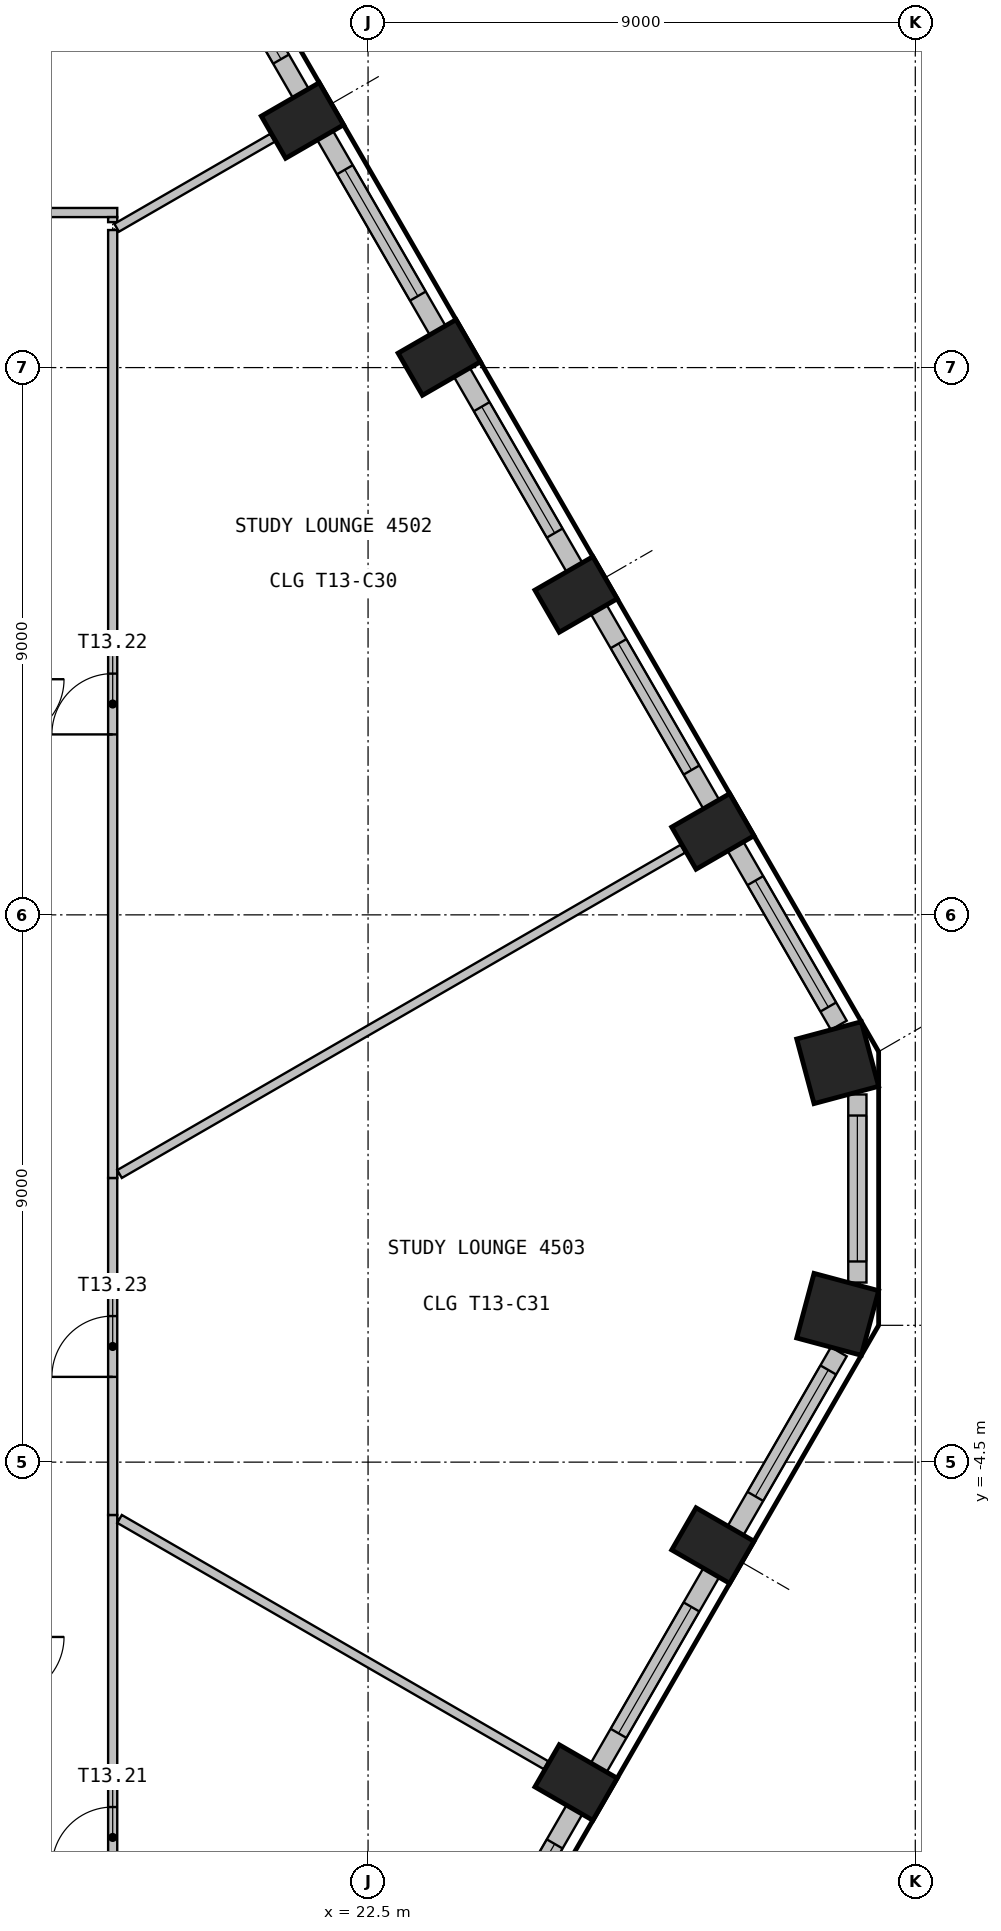
"""IFC4 building model, lengths in metres.
Left out: names, types, materials, properties, quantities, classifications, styles, units other than length and angle.
Written with IfcOpenShell. Run it as: python <this file> out.ifc"""

import sys

from ifc_helpers import new_model, si_unit, direction, frame, frame_2d, origin, origin_2d, place, context, subcontext, project, spatial, rectangle, extrude, element, fill, save


model = new_model("IFC4")
c1 = context("Model", 3, precision=1e-05, world=origin(), true_north=direction((0.0, 1.0)))
c2 = subcontext(c1, "Body", "Model", "MODEL_VIEW")
j1 = project(units=[si_unit("LENGTHUNIT", "METRE"), si_unit("PLANEANGLEUNIT", "RADIAN")], contexts=[c1])
p1 = place(None, origin())
s1 = spatial("IfcSite", under=j1, at=p1, CompositionType="ELEMENT")
p2 = place(p1, origin())
s2 = spatial("IfcBuilding", under=s1, at=p2, CompositionType="ELEMENT")
p3 = place(p2, frame((0.0, 0.0, 183.9)))
s3 = spatial("IfcBuildingStorey", under=s2, at=p3, CompositionType="ELEMENT", Elevation=183.9)
for number, where, z_axis, x_axis in (
    (1, (25.921, -9.769, 0.0), (0.0, 0.0, 1.0), (0.5, 0.866, 0.0)),
    (2, (28.171, -5.872, 0.0), (0.0, 0.0, 1.0), (0.5, 0.866, 0.0)),
):
    element("IfcColumn", number, at=place(p3, frame(where, z_axis=z_axis, x_axis=x_axis)), inside=s3, PredefinedType="COLUMN", context=c2, shape_type="SweptSolid", body=[
        extrude(rectangle(XDim=0.8, YDim=1.1, at=origin_2d()), origin(), (0.0, 0.0, 1.0), 3.55),
    ])
for number, where, z_axis, x_axis in (
    (3, (30.223, -2.07, 0.0), (0.0, 0.0, 1.0), (0.259, 0.966, 0.0)),
    (4, (30.223, 2.07, 0.0), (0.0, 0.0, 1.0), (-0.259, 0.966, 0.0)),
):
    element("IfcColumn", number, at=place(p3, frame(where, z_axis=z_axis, x_axis=x_axis)), inside=s3, PredefinedType="COLUMN", context=c2, shape_type="SweptSolid", body=[
        extrude(rectangle(XDim=1.1, YDim=1.1, at=origin_2d()), origin(), (0.0, 0.0, 1.0), 3.55),
    ])
for number, where, z_axis, x_axis in (
    (5, (28.171, 5.872, 0.0), (0.0, 0.0, 1.0), (-0.5, 0.866, 0.0)),
    (6, (25.921, 9.769, 0.0), (0.0, 0.0, 1.0), (-0.5, 0.866, 0.0)),
    (7, (23.671, 13.666, 0.0), (0.0, 0.0, 1.0), (-0.5, 0.866, 0.0)),
    (8, (21.421, 17.563, 0.0), (0.0, 0.0, 1.0), (-0.5, 0.866, 0.0)),
):
    element("IfcColumn", number, at=place(p3, frame(where, z_axis=z_axis, x_axis=x_axis)), inside=s3, PredefinedType="COLUMN", context=c2, shape_type="SweptSolid", body=[
        extrude(rectangle(XDim=0.8, YDim=1.1, at=origin_2d()), origin(), (0.0, 0.0, 1.0), 3.55),
    ])
p4 = place(p3, frame((24.044, -13.419, 0.0), z_axis=(0.0, 0.0, 1.0), x_axis=(0.500029062817, 0.866008623709, 0.0)))
e9 = element("IfcWall", 9, at=p4, inside=s3, PredefinedType="SOLIDWALL", context=c2, shape_type="SweptSolid", body=[
    extrude(rectangle(XDim=3.699, YDim=0.3, at=frame_2d((1.85, 0.0))), origin(), (0.0, 0.0, 1.0), 3.55),
])
p5 = place(p4, frame((0.649, 0.0, 0.9)))
e10 = element("IfcOpeningElement", 10, at=p5, cuts=e9, PredefinedType="OPENING", context=c2, shape_type="SweptSolid", body=[
    extrude(rectangle(XDim=2.4, YDim=2.1, at=frame_2d((1.2, 1.05))), frame((0.0, 0.16, 0.0), z_axis=(0.0, -1.0, 0.0), x_axis=(1.0, 0.0, 0.0)), (0.0, 0.0, 1.0), 0.32),
])
p6 = place(p3, frame((26.294, -9.522, 0.0), z_axis=(0.0, 0.0, 1.0), x_axis=(0.500029062817, 0.866008623709, 0.0)))
e11 = element("IfcWall", 11, at=p6, inside=s3, PredefinedType="SOLIDWALL", context=c2, shape_type="SweptSolid", body=[
    extrude(rectangle(XDim=3.699, YDim=0.3, at=frame_2d((1.85, 0.0))), origin(), (0.0, 0.0, 1.0), 3.55),
])
p7 = place(p6, frame((0.649, 0.0, 0.9)))
e12 = element("IfcOpeningElement", 12, at=p7, cuts=e11, PredefinedType="OPENING", context=c2, shape_type="SweptSolid", body=[
    extrude(rectangle(XDim=2.4, YDim=2.1, at=frame_2d((1.2, 1.05))), frame((0.0, 0.16, 0.0), z_axis=(0.0, -1.0, 0.0), x_axis=(1.0, 0.0, 0.0)), (0.0, 0.0, 1.0), 0.32),
])
p8 = place(p3, frame((28.544, -5.625, 0.0), z_axis=(0.0, 0.0, 1.0), x_axis=(0.500012868213, 0.866017974191, 0.0)))
e13 = element("IfcWall", 13, at=p8, inside=s3, PredefinedType="SOLIDWALL", context=c2, shape_type="SweptSolid", body=[
    extrude(rectangle(XDim=3.396, YDim=0.3, at=frame_2d((1.698, 0.0))), origin(), (0.0, 0.0, 1.0), 3.55),
])
p9 = place(p8, frame((0.649, 0.0, 0.9)))
e14 = element("IfcOpeningElement", 14, at=p9, cuts=e13, PredefinedType="OPENING", context=c2, shape_type="SweptSolid", body=[
    extrude(rectangle(XDim=2.4, YDim=2.1, at=frame_2d((1.2, 1.05))), frame((0.0, 0.16, 0.0), z_axis=(0.0, -1.0, 0.0), x_axis=(1.0, 0.0, 0.0)), (0.0, 0.0, 1.0), 0.32),
])
p10 = place(p3, frame((30.547, -1.546, 0.0), z_axis=(0.0, 0.0, 1.0), x_axis=(0.0, 1.0, 0.0)))
e15 = element("IfcWall", 15, at=p10, inside=s3, PredefinedType="SOLIDWALL", context=c2, shape_type="SweptSolid", body=[
    extrude(rectangle(XDim=3.093, YDim=0.3, at=frame_2d((1.546, 0.0))), origin(), (0.0, 0.0, 1.0), 3.55),
])
p11 = place(p10, frame((0.346, 0.0, 0.9)))
e16 = element("IfcOpeningElement", 16, at=p11, cuts=e15, PredefinedType="OPENING", context=c2, shape_type="SweptSolid", body=[
    extrude(rectangle(XDim=2.4, YDim=2.1, at=frame_2d((1.2, 1.05))), frame((0.0, 0.16, 0.0), z_axis=(0.0, -1.0, 0.0), x_axis=(1.0, 0.0, 0.0)), (0.0, 0.0, 1.0), 0.32),
])
p12 = place(p3, frame((30.242, 2.684, 0.0), z_axis=(0.0, 0.0, 1.0), x_axis=(-0.500012868213, 0.866017974191, 0.0)))
e17 = element("IfcWall", 17, at=p12, inside=s3, PredefinedType="SOLIDWALL", context=c2, shape_type="SweptSolid", body=[
    extrude(rectangle(XDim=3.396, YDim=0.3, at=frame_2d((1.698, 0.0))), origin(), (0.0, 0.0, 1.0), 3.55),
])
p13 = place(p12, frame((0.346, 0.0, 0.9)))
e18 = element("IfcOpeningElement", 18, at=p13, cuts=e17, PredefinedType="OPENING", context=c2, shape_type="SweptSolid", body=[
    extrude(rectangle(XDim=2.4, YDim=2.1, at=frame_2d((1.2, 1.05))), frame((0.0, 0.16, 0.0), z_axis=(0.0, -1.0, 0.0), x_axis=(1.0, 0.0, 0.0)), (0.0, 0.0, 1.0), 0.32),
])
p14 = place(p3, frame((28.144, 6.319, 0.0), z_axis=(0.0, 0.0, 1.0), x_axis=(-0.500029062817, 0.866008623709, 0.0)))
e19 = element("IfcWall", 19, at=p14, inside=s3, PredefinedType="SOLIDWALL", context=c2, shape_type="SweptSolid", body=[
    extrude(rectangle(XDim=3.699, YDim=0.3, at=frame_2d((1.85, 0.0))), origin(), (0.0, 0.0, 1.0), 3.55),
])
p15 = place(p14, frame((0.649, 0.0, 0.9)))
e20 = element("IfcOpeningElement", 20, at=p15, cuts=e19, PredefinedType="OPENING", context=c2, shape_type="SweptSolid", body=[
    extrude(rectangle(XDim=2.4, YDim=2.1, at=frame_2d((1.2, 1.05))), frame((0.0, 0.16, 0.0), z_axis=(0.0, -1.0, 0.0), x_axis=(1.0, 0.0, 0.0)), (0.0, 0.0, 1.0), 0.32),
])
p16 = place(p3, frame((25.894, 10.216, 0.0), z_axis=(0.0, 0.0, 1.0), x_axis=(-0.500029062817, 0.866008623709, 0.0)))
e21 = element("IfcWall", 21, at=p16, inside=s3, PredefinedType="SOLIDWALL", context=c2, shape_type="SweptSolid", body=[
    extrude(rectangle(XDim=3.699, YDim=0.3, at=frame_2d((1.85, 0.0))), origin(), (0.0, 0.0, 1.0), 3.55),
])
p17 = place(p16, frame((0.649, 0.0, 0.9)))
e22 = element("IfcOpeningElement", 22, at=p17, cuts=e21, PredefinedType="OPENING", context=c2, shape_type="SweptSolid", body=[
    extrude(rectangle(XDim=2.4, YDim=2.1, at=frame_2d((1.2, 1.05))), frame((0.0, 0.16, 0.0), z_axis=(0.0, -1.0, 0.0), x_axis=(1.0, 0.0, 0.0)), (0.0, 0.0, 1.0), 0.32),
])
p18 = place(p3, frame((23.644, 14.113, 0.0), z_axis=(0.0, 0.0, 1.0), x_axis=(-0.500029062817, 0.866008623709, 0.0)))
e23 = element("IfcWall", 23, at=p18, inside=s3, PredefinedType="SOLIDWALL", context=c2, shape_type="SweptSolid", body=[
    extrude(rectangle(XDim=3.699, YDim=0.3, at=frame_2d((1.85, 0.0))), origin(), (0.0, 0.0, 1.0), 3.55),
])
p19 = place(p18, frame((0.649, 0.0, 0.9)))
e24 = element("IfcOpeningElement", 24, at=p19, cuts=e23, PredefinedType="OPENING", context=c2, shape_type="SweptSolid", body=[
    extrude(rectangle(XDim=2.4, YDim=2.1, at=frame_2d((1.2, 1.05))), frame((0.0, 0.16, 0.0), z_axis=(0.0, -1.0, 0.0), x_axis=(1.0, 0.0, 0.0)), (0.0, 0.0, 1.0), 0.32),
])
p20 = place(p3, frame((21.394, 18.01, 0.0), z_axis=(0.0, 0.0, 1.0), x_axis=(-0.500012868213, 0.866017974191, 0.0)))
e25 = element("IfcWall", 25, at=p20, inside=s3, PredefinedType="SOLIDWALL", context=c2, shape_type="SweptSolid", body=[
    extrude(rectangle(XDim=3.396, YDim=0.3, at=frame_2d((1.698, 0.0))), origin(), (0.0, 0.0, 1.0), 3.55),
])
p21 = place(p20, frame((0.649, 0.0, 0.9)))
e26 = element("IfcOpeningElement", 26, at=p21, cuts=e25, PredefinedType="OPENING", context=c2, shape_type="SweptSolid", body=[
    extrude(rectangle(XDim=2.4, YDim=2.1, at=frame_2d((1.2, 1.05))), frame((0.0, 0.16, 0.0), z_axis=(0.0, -1.0, 0.0), x_axis=(1.0, 0.0, 0.0)), (0.0, 0.0, 1.0), 0.32),
])
p22 = place(p3, frame((18.375, 16.05, 0.0), z_axis=(0.0, 0.0, 1.0), x_axis=(-1.0, 0.0, 0.0)))
e27 = element("IfcWall", 27, at=p22, inside=s3, PredefinedType="PARTITIONING", context=c2, shape_type="SweptSolid", body=[
    extrude(rectangle(XDim=4.656, YDim=0.15, at=frame_2d((2.328, 0.0))), origin(), (0.0, 0.0, 1.0), 3.55),
])
p23 = place(p22, frame((1.828, 0.0, 0.0)))
e28 = element("IfcOpeningElement", 28, at=p23, cuts=e27, PredefinedType="OPENING", context=c2, shape_type="SweptSolid", body=[
    extrude(rectangle(XDim=1.0, YDim=2.1, at=frame_2d((0.5, 1.05))), frame((0.0, 0.085, 0.0), z_axis=(0.0, -1.0, 0.0), x_axis=(1.0, 0.0, 0.0)), (0.0, 0.0, 1.0), 0.17),
])
p24 = place(p3, frame((18.3, -15.975, 0.0), z_axis=(0.0, 0.0, 1.0), x_axis=(0.0, 1.0, 0.0)))
e29 = element("IfcWall", 29, at=p24, inside=s3, PredefinedType="PARTITIONING", context=c2, shape_type="SweptSolid", body=[
    extrude(rectangle(XDim=10.606, YDim=0.15, at=frame_2d((5.303, 0.0))), origin(), (0.0, 0.0, 1.0), 3.55),
])
p25 = place(p24, frame((4.803, 0.0, 0.0)))
e30 = element("IfcOpeningElement", 30, at=p25, cuts=e29, PredefinedType="OPENING", context=c2, shape_type="SweptSolid", body=[
    extrude(rectangle(XDim=1.0, YDim=2.1, at=frame_2d((0.5, 1.05))), frame((0.0, 0.085, 0.0), z_axis=(0.0, -1.0, 0.0), x_axis=(1.0, 0.0, 0.0)), (0.0, 0.0, 1.0), 0.17),
])
p26 = place(p3, frame((18.3, -5.369, 0.0), z_axis=(0.0, 0.0, 1.0), x_axis=(0.0, 1.0, 0.0)))
e31 = element("IfcWall", 31, at=p26, inside=s3, PredefinedType="PARTITIONING", context=c2, shape_type="SweptSolid", body=[
    extrude(rectangle(XDim=5.542, YDim=0.15, at=frame_2d((2.771, 0.0))), origin(), (0.0, 0.0, 1.0), 3.55),
])
p27 = place(p26, frame((2.271, 0.0, 0.0)))
e32 = element("IfcOpeningElement", 32, at=p27, cuts=e31, PredefinedType="OPENING", context=c2, shape_type="SweptSolid", body=[
    extrude(rectangle(XDim=1.0, YDim=2.1, at=frame_2d((0.5, 1.05))), frame((0.0, 0.085, 0.0), z_axis=(0.0, -1.0, 0.0), x_axis=(1.0, 0.0, 0.0)), (0.0, 0.0, 1.0), 0.17),
])
p28 = place(p3, frame((18.413, -5.434, 0.0), z_axis=(0.0, 0.0, 1.0), x_axis=(0.866017937352, -0.500012932018, 0.0)))
e33 = element("IfcWall", 33, at=p28, inside=s3, PredefinedType="PARTITIONING", context=c2, shape_type="SweptSolid", body=[
    extrude(rectangle(XDim=8.1, YDim=0.15, at=frame_2d((4.05, 0.0))), origin(), (0.0, 0.0, 1.0), 3.55),
])
p29 = place(p3, frame((18.3, 0.173, 0.0), z_axis=(0.0, 0.0, 1.0), x_axis=(0.0, 1.0, 0.0)))
e34 = element("IfcWall", 34, at=p29, inside=s3, PredefinedType="PARTITIONING", context=c2, shape_type="SweptSolid", body=[
    extrude(rectangle(XDim=15.589, YDim=0.15, at=frame_2d((7.794, 0.0))), origin(), (0.0, 0.0, 1.0), 3.55),
])
p30 = place(p29, frame((7.294, 0.0, 0.0)))
e35 = element("IfcOpeningElement", 35, at=p30, cuts=e34, PredefinedType="OPENING", context=c2, shape_type="SweptSolid", body=[
    extrude(rectangle(XDim=1.0, YDim=2.1, at=frame_2d((0.5, 1.05))), frame((0.0, 0.085, 0.0), z_axis=(0.0, -1.0, 0.0), x_axis=(1.0, 0.0, 0.0)), (0.0, 0.0, 1.0), 0.17),
])
p31 = place(p3, frame((27.677, 5.587, 0.0), z_axis=(0.0, 0.0, 1.0), x_axis=(-0.866012662218, -0.50002206839, 0.0)))
e36 = element("IfcWall", 36, at=p31, inside=s3, PredefinedType="PARTITIONING", context=c2, shape_type="SweptSolid", body=[
    extrude(rectangle(XDim=10.698, YDim=0.15, at=frame_2d((5.349, 0.0))), origin(), (0.0, 0.0, 1.0), 3.55),
])
p32 = place(p3, frame((18.3, 15.892, 0.0), z_axis=(0.0, 0.0, 1.0), x_axis=(0.0, 1.0, 0.0)))
e37 = element("IfcWall", 37, at=p32, inside=s3, PredefinedType="PARTITIONING", context=c2, shape_type="SweptSolid", body=[
    extrude(rectangle(XDim=0.083, YDim=0.15, at=frame_2d((0.042, 0.0))), origin(), (0.0, 0.0, 1.0), 3.55),
])
p33 = place(p3, frame((20.927, 17.278, 0.0), z_axis=(0.0, 0.0, 1.0), x_axis=(-0.866107263007, -0.499858188855, 0.0)))
e38 = element("IfcWall", 38, at=p33, inside=s3, PredefinedType="PARTITIONING", context=c2, shape_type="SweptSolid", body=[
    extrude(rectangle(XDim=2.958, YDim=0.15, at=frame_2d((1.479, 0.0))), origin(), (0.0, 0.0, 1.0), 3.55),
])
p34 = place(p5, origin())
e39 = element("IfcWindow", 39, at=p34, inside=s3, PartitioningType="SINGLE_PANEL", PredefinedType="WINDOW", context=c2, shape_type="SweptSolid", body=[
    extrude(rectangle(XDim=2.4, YDim=2.1, at=frame_2d((1.2, 1.05))), frame((0.0, 0.03, 0.0), z_axis=(0.0, -1.0, 0.0), x_axis=(1.0, 0.0, 0.0)), (0.0, 0.0, 1.0), 0.06),
])
fill(e10, e39)
p35 = place(p7, origin())
e40 = element("IfcWindow", 40, at=p35, inside=s3, PartitioningType="SINGLE_PANEL", PredefinedType="WINDOW", context=c2, shape_type="SweptSolid", body=[
    extrude(rectangle(XDim=2.4, YDim=2.1, at=frame_2d((1.2, 1.05))), frame((0.0, 0.03, 0.0), z_axis=(0.0, -1.0, 0.0), x_axis=(1.0, 0.0, 0.0)), (0.0, 0.0, 1.0), 0.06),
])
fill(e12, e40)
p36 = place(p9, origin())
e41 = element("IfcWindow", 41, at=p36, inside=s3, PartitioningType="SINGLE_PANEL", PredefinedType="WINDOW", context=c2, shape_type="SweptSolid", body=[
    extrude(rectangle(XDim=2.4, YDim=2.1, at=frame_2d((1.2, 1.05))), frame((0.0, 0.03, 0.0), z_axis=(0.0, -1.0, 0.0), x_axis=(1.0, 0.0, 0.0)), (0.0, 0.0, 1.0), 0.06),
])
fill(e14, e41)
p37 = place(p11, origin())
e42 = element("IfcWindow", 42, at=p37, inside=s3, PartitioningType="SINGLE_PANEL", PredefinedType="WINDOW", context=c2, shape_type="SweptSolid", body=[
    extrude(rectangle(XDim=2.4, YDim=2.1, at=frame_2d((1.2, 1.05))), frame((0.0, 0.03, 0.0), z_axis=(0.0, -1.0, 0.0), x_axis=(1.0, 0.0, 0.0)), (0.0, 0.0, 1.0), 0.06),
])
fill(e16, e42)
p38 = place(p13, origin())
e43 = element("IfcWindow", 43, at=p38, inside=s3, PartitioningType="SINGLE_PANEL", PredefinedType="WINDOW", context=c2, shape_type="SweptSolid", body=[
    extrude(rectangle(XDim=2.4, YDim=2.1, at=frame_2d((1.2, 1.05))), frame((0.0, 0.03, 0.0), z_axis=(0.0, -1.0, 0.0), x_axis=(1.0, 0.0, 0.0)), (0.0, 0.0, 1.0), 0.06),
])
fill(e18, e43)
p39 = place(p15, origin())
e44 = element("IfcWindow", 44, at=p39, inside=s3, PartitioningType="SINGLE_PANEL", PredefinedType="WINDOW", context=c2, shape_type="SweptSolid", body=[
    extrude(rectangle(XDim=2.4, YDim=2.1, at=frame_2d((1.2, 1.05))), frame((0.0, 0.03, 0.0), z_axis=(0.0, -1.0, 0.0), x_axis=(1.0, 0.0, 0.0)), (0.0, 0.0, 1.0), 0.06),
])
fill(e20, e44)
p40 = place(p17, origin())
e45 = element("IfcWindow", 45, at=p40, inside=s3, PartitioningType="SINGLE_PANEL", PredefinedType="WINDOW", context=c2, shape_type="SweptSolid", body=[
    extrude(rectangle(XDim=2.4, YDim=2.1, at=frame_2d((1.2, 1.05))), frame((0.0, 0.03, 0.0), z_axis=(0.0, -1.0, 0.0), x_axis=(1.0, 0.0, 0.0)), (0.0, 0.0, 1.0), 0.06),
])
fill(e22, e45)
p41 = place(p19, origin())
e46 = element("IfcWindow", 46, at=p41, inside=s3, PartitioningType="SINGLE_PANEL", PredefinedType="WINDOW", context=c2, shape_type="SweptSolid", body=[
    extrude(rectangle(XDim=2.4, YDim=2.1, at=frame_2d((1.2, 1.05))), frame((0.0, 0.03, 0.0), z_axis=(0.0, -1.0, 0.0), x_axis=(1.0, 0.0, 0.0)), (0.0, 0.0, 1.0), 0.06),
])
fill(e24, e46)
p42 = place(p21, origin())
e47 = element("IfcWindow", 47, at=p42, inside=s3, PartitioningType="SINGLE_PANEL", PredefinedType="WINDOW", context=c2, shape_type="SweptSolid", body=[
    extrude(rectangle(XDim=2.4, YDim=2.1, at=frame_2d((1.2, 1.05))), frame((0.0, 0.03, 0.0), z_axis=(0.0, -1.0, 0.0), x_axis=(1.0, 0.0, 0.0)), (0.0, 0.0, 1.0), 0.06),
])
fill(e26, e47)
p43 = place(p25, origin())
e48 = element("IfcDoor", 48, at=p43, inside=s3, OperationType="SINGLE_SWING_LEFT", PredefinedType="DOOR", context=c2, shape_type="SweptSolid", body=[
    extrude(rectangle(XDim=1.0, YDim=2.1, at=frame_2d((0.5, 1.05))), frame((0.0, 0.025, 0.0), z_axis=(0.0, -1.0, 0.0), x_axis=(1.0, 0.0, 0.0)), (0.0, 0.0, 1.0), 0.05),
])
fill(e30, e48)
p44 = place(p30, origin())
e49 = element("IfcDoor", 49, at=p44, inside=s3, OperationType="SINGLE_SWING_RIGHT", PredefinedType="DOOR", context=c2, shape_type="SweptSolid", body=[
    extrude(rectangle(XDim=1.0, YDim=2.1, at=frame_2d((0.5, 1.05))), frame((0.0, 0.025, 0.0), z_axis=(0.0, -1.0, 0.0), x_axis=(1.0, 0.0, 0.0)), (0.0, 0.0, 1.0), 0.05),
])
fill(e35, e49)
p45 = place(p27, origin())
e50 = element("IfcDoor", 50, at=p45, inside=s3, OperationType="SINGLE_SWING_LEFT", PredefinedType="DOOR", context=c2, shape_type="SweptSolid", body=[
    extrude(rectangle(XDim=1.0, YDim=2.1, at=frame_2d((0.5, 1.05))), frame((0.0, 0.025, 0.0), z_axis=(0.0, -1.0, 0.0), x_axis=(1.0, 0.0, 0.0)), (0.0, 0.0, 1.0), 0.05),
])
fill(e32, e50)
save(model, sys.argv[1])
